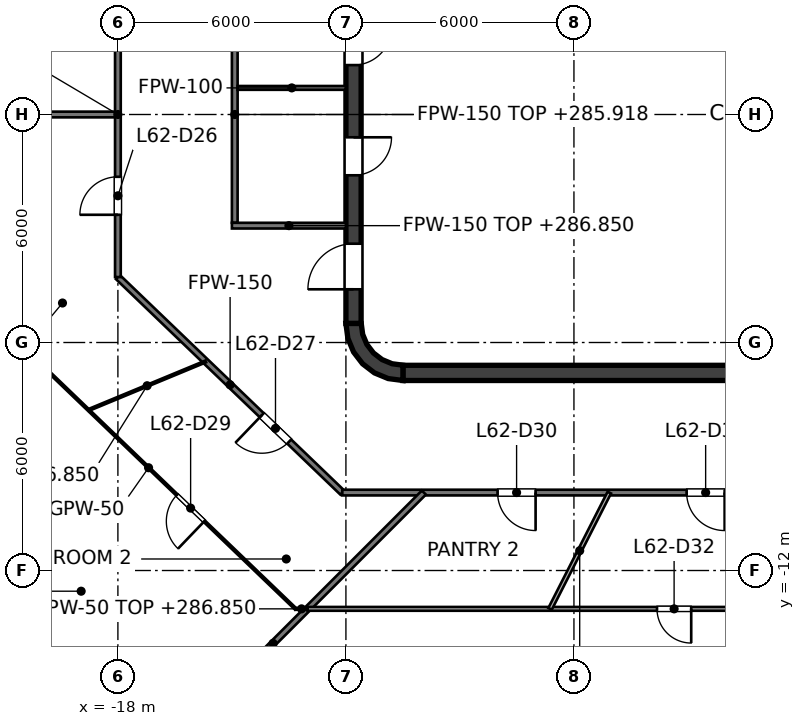
"""IFC4 building model, lengths in metres.
Left out: names, types, materials, properties, quantities, classifications, styles, units other than length and angle.
Written with IfcOpenShell. Run it as: python <this file> out.ifc"""

import sys

from ifc_helpers import new_model, si_unit, direction, frame, frame_2d, origin, place, context, subcontext, project, spatial, polyline, rectangle, outline, extrude, element, fill, save


model = new_model("IFC4")
c1 = context("Model", 3, precision=1e-05, world=origin(), true_north=direction((0.0, 1.0)))
c2 = subcontext(c1, "Body", "Model", "MODEL_VIEW")
j1 = project(units=[si_unit("LENGTHUNIT", "METRE"), si_unit("PLANEANGLEUNIT", "RADIAN")], contexts=[c1])
p1 = place(None, origin())
s1 = spatial("IfcSite", under=j1, at=p1, CompositionType="ELEMENT")
p2 = place(p1, origin())
s2 = spatial("IfcBuilding", under=s1, at=p2, CompositionType="ELEMENT")
p3 = place(p2, frame((0.0, 0.0, 283.0)))
s3 = spatial("IfcBuildingStorey", under=s2, at=p3, CompositionType="ELEMENT", Elevation=283.0)
p4 = place(p3, frame((-10.5, -6.8, 0.0), z_axis=(0.0, 0.0, 1.0), x_axis=(1.0, 0.0, 0.0)))
e1 = element("IfcWall", 1, at=p4, inside=s3, PredefinedType="SHEAR", context=c2, shape_type="SweptSolid", body=[
    extrude(rectangle(XDim=21.0, YDim=0.4, at=frame_2d((10.5, 0.0))), origin(), (0.0, 0.0, 1.0), 4.0),
])
p5 = place(p3, frame((-11.8, -5.5, 0.0), z_axis=(0.0, 0.0, 1.0), x_axis=(0.0, 1.0, 0.0)))
e2 = element("IfcWall", 2, at=p5, inside=s3, PredefinedType="SHEAR", context=c2, shape_type="SweptSolid", body=[
    extrude(rectangle(XDim=11.0, YDim=0.4, at=frame_2d((5.5, 0.0))), origin(), (0.0, 0.0, 1.0), 4.0),
])
p6 = place(p5, frame((3.9, 0.0, 0.0)))
e3 = element("IfcOpeningElement", 3, at=p6, cuts=e2, PredefinedType="OPENING", context=c2, shape_type="SweptSolid", body=[
    extrude(rectangle(XDim=1.0, YDim=2.1, at=frame_2d((0.5, 1.05))), frame((0.0, 0.2, 0.0), z_axis=(0.0, -1.0, 0.0), x_axis=(1.0, 0.0, 0.0)), (0.0, 0.0, 1.0), 0.4),
])
p7 = place(p5, frame((6.8, 0.0, 0.0)))
e4 = element("IfcOpeningElement", 4, at=p7, cuts=e2, PredefinedType="OPENING", context=c2, shape_type="SweptSolid", body=[
    extrude(rectangle(XDim=1.0, YDim=2.1, at=frame_2d((0.5, 1.05))), frame((0.0, 0.2, 0.0), z_axis=(0.0, -1.0, 0.0), x_axis=(1.0, 0.0, 0.0)), (0.0, 0.0, 1.0), 0.4),
])
p8 = place(p5, frame((0.9, 0.0, 0.0)))
e5 = element("IfcOpeningElement", 5, at=p8, cuts=e2, PredefinedType="OPENING", context=c2, shape_type="SweptSolid", body=[
    extrude(rectangle(XDim=1.2, YDim=2.1, at=frame_2d((0.6, 1.05))), frame((0.0, 0.2, 0.0), z_axis=(0.0, -1.0, 0.0), x_axis=(1.0, 0.0, 0.0)), (0.0, 0.0, 1.0), 0.4),
])
p9 = place(p5, frame((8.9, 0.0, 0.0)))
e6 = element("IfcOpeningElement", 6, at=p9, cuts=e2, PredefinedType="OPENING", context=c2, shape_type="SweptSolid", body=[
    extrude(rectangle(XDim=1.2, YDim=2.1, at=frame_2d((0.6, 1.05))), frame((0.0, 0.2, 0.0), z_axis=(0.0, -1.0, 0.0), x_axis=(1.0, 0.0, 0.0)), (0.0, 0.0, 1.0), 0.4),
])
p10 = place(p3, origin())
e7 = element("IfcWall", 7, at=p10, inside=s3, PredefinedType="SHEAR", context=c2, shape_type="SweptSolid", body=[
    extrude(outline(polyline([(-10.5, -7.0), (-10.5, -6.596), (-10.784, -6.559), (-11.048, -6.45), (-11.275, -6.275), (-11.45, -6.048), (-11.559, -5.784), (-11.596, -5.5), (-12.0, -5.5), (-11.949, -5.888), (-11.799, -6.25), (-11.561, -6.561), (-11.25, -6.799), (-10.888, -6.949), (-10.5, -7.0)])), origin(), (0.0, 0.0, 1.0), 4.0),
])
p11 = place(p3, frame((-9.0, -6.6, 0.0), z_axis=(0.0, 0.0, 1.0), x_axis=(0.0, 1.0, 0.0)))
e8 = element("IfcWall", 8, at=p11, inside=s3, PredefinedType="PARTITIONING", context=c2, shape_type="SweptSolid", body=[
    extrude(rectangle(XDim=2.5, YDim=0.25, at=frame_2d((1.25, 0.0))), origin(), (0.0, 0.0, 1.0), 3.85),
])
p12 = place(p11, frame((0.75, 0.0, 0.0)))
e9 = element("IfcOpeningElement", 9, at=p12, cuts=e8, PredefinedType="OPENING", context=c2, shape_type="SweptSolid", body=[
    extrude(rectangle(XDim=1.0, YDim=2.1, at=frame_2d((0.5, 1.05))), frame((0.0, 0.125, 0.0), z_axis=(0.0, -1.0, 0.0), x_axis=(1.0, 0.0, 0.0)), (0.0, 0.0, 1.0), 0.25),
])
p13 = place(p3, frame((-2.9, -6.6, 0.0), z_axis=(0.0, 0.0, 1.0), x_axis=(0.0, 1.0, 0.0)))
e10 = element("IfcWall", 10, at=p13, inside=s3, PredefinedType="PARTITIONING", context=c2, shape_type="SweptSolid", body=[
    extrude(rectangle(XDim=2.5, YDim=0.25, at=frame_2d((1.25, 0.0))), origin(), (0.0, 0.0, 1.0), 3.85),
])
p14 = place(p13, frame((0.8, 0.0, 0.0)))
e11 = element("IfcOpeningElement", 11, at=p14, cuts=e10, PredefinedType="OPENING", context=c2, shape_type="SweptSolid", body=[
    extrude(rectangle(XDim=0.9, YDim=2.1, at=frame_2d((0.45, 1.05))), frame((0.0, 0.125, 0.0), z_axis=(0.0, -1.0, 0.0), x_axis=(1.0, 0.0, 0.0)), (0.0, 0.0, 1.0), 0.25),
])
p15 = place(p3, frame((-9.125, 1.525, 0.0), z_axis=(0.0, 0.0, 1.0), x_axis=(1.0, 0.0, 0.0)))
e12 = element("IfcWall", 12, at=p15, inside=s3, PredefinedType="SOLIDWALL", context=c2, shape_type="SweptSolid", body=[
    extrude(rectangle(XDim=8.35, YDim=0.25, at=frame_2d((4.175, 0.0))), origin(), (0.0, 0.0, 1.0), 3.85),
])
p16 = place(p15, frame((0.925, 0.0, 0.0)))
e13 = element("IfcOpeningElement", 13, at=p16, cuts=e12, PredefinedType="OPENING", context=c2, shape_type="SweptSolid", body=[
    extrude(rectangle(XDim=1.1, YDim=2.1, at=frame_2d((0.55, 1.05))), frame((0.0, 0.125, 0.0), z_axis=(0.0, -1.0, 0.0), x_axis=(1.0, 0.0, 0.0)), (0.0, 0.0, 1.0), 0.25),
])
p17 = place(p15, frame((3.625, 0.0, 0.0)))
e14 = element("IfcOpeningElement", 14, at=p17, cuts=e12, PredefinedType="OPENING", context=c2, shape_type="SweptSolid", body=[
    extrude(rectangle(XDim=1.1, YDim=2.1, at=frame_2d((0.55, 1.05))), frame((0.0, 0.125, 0.0), z_axis=(0.0, -1.0, 0.0), x_axis=(1.0, 0.0, 0.0)), (0.0, 0.0, 1.0), 0.25),
])
p18 = place(p15, frame((6.325, 0.0, 0.0)))
e15 = element("IfcOpeningElement", 15, at=p18, cuts=e12, PredefinedType="OPENING", context=c2, shape_type="SweptSolid", body=[
    extrude(rectangle(XDim=1.1, YDim=2.1, at=frame_2d((0.55, 1.05))), frame((0.0, 0.125, 0.0), z_axis=(0.0, -1.0, 0.0), x_axis=(1.0, 0.0, 0.0)), (0.0, 0.0, 1.0), 0.25),
])
p19 = place(p3, frame((-9.125, -1.525, 0.0), z_axis=(0.0, 0.0, 1.0), x_axis=(1.0, 0.0, 0.0)))
e16 = element("IfcWall", 16, at=p19, inside=s3, PredefinedType="SOLIDWALL", context=c2, shape_type="SweptSolid", body=[
    extrude(rectangle(XDim=18.25, YDim=0.25, at=frame_2d((9.125, 0.0))), origin(), (0.0, 0.0, 1.0), 3.85),
])
p20 = place(p19, frame((7.15, 0.0, 0.0)))
e17 = element("IfcOpeningElement", 17, at=p20, cuts=e16, PredefinedType="OPENING", context=c2, shape_type="SweptSolid", body=[
    extrude(rectangle(XDim=1.2, YDim=2.1, at=frame_2d((0.6, 1.05))), frame((0.0, 0.125, 0.0), z_axis=(0.0, -1.0, 0.0), x_axis=(1.0, 0.0, 0.0)), (0.0, 0.0, 1.0), 0.25),
])
p21 = place(p19, frame((10.2, 0.0, 0.0)))
e18 = element("IfcOpeningElement", 18, at=p21, cuts=e16, PredefinedType="OPENING", context=c2, shape_type="SweptSolid", body=[
    extrude(rectangle(XDim=1.2, YDim=2.1, at=frame_2d((0.6, 1.05))), frame((0.0, 0.125, 0.0), z_axis=(0.0, -1.0, 0.0), x_axis=(1.0, 0.0, 0.0)), (0.0, 0.0, 1.0), 0.25),
])
p22 = place(p19, frame((16.075, 0.0, 0.0)))
e19 = element("IfcOpeningElement", 19, at=p22, cuts=e16, PredefinedType="OPENING", context=c2, shape_type="SweptSolid", body=[
    extrude(rectangle(XDim=1.0, YDim=2.1, at=frame_2d((0.5, 1.05))), frame((0.0, 0.125, 0.0), z_axis=(0.0, -1.0, 0.0), x_axis=(1.0, 0.0, 0.0)), (0.0, 0.0, 1.0), 0.25),
])
p23 = place(p3, frame((-9.125, -3.975, 0.0), z_axis=(0.0, 0.0, 1.0), x_axis=(1.0, 0.0, 0.0)))
e20 = element("IfcWall", 20, at=p23, inside=s3, PredefinedType="SOLIDWALL", context=c2, shape_type="SweptSolid", body=[
    extrude(rectangle(XDim=12.4, YDim=0.25, at=frame_2d((6.2, 0.0))), origin(), (0.0, 0.0, 1.0), 3.85),
])
p24 = place(p23, frame((1.05, 0.0, 0.0)))
e21 = element("IfcOpeningElement", 21, at=p24, cuts=e20, PredefinedType="OPENING", context=c2, shape_type="SweptSolid", body=[
    extrude(rectangle(XDim=1.2, YDim=2.1, at=frame_2d((0.6, 1.05))), frame((0.0, 0.125, 0.0), z_axis=(0.0, -1.0, 0.0), x_axis=(1.0, 0.0, 0.0)), (0.0, 0.0, 1.0), 0.25),
])
p25 = place(p23, frame((4.1, 0.0, 0.0)))
e22 = element("IfcOpeningElement", 22, at=p25, cuts=e20, PredefinedType="OPENING", context=c2, shape_type="SweptSolid", body=[
    extrude(rectangle(XDim=1.2, YDim=2.1, at=frame_2d((0.6, 1.05))), frame((0.0, 0.125, 0.0), z_axis=(0.0, -1.0, 0.0), x_axis=(1.0, 0.0, 0.0)), (0.0, 0.0, 1.0), 0.25),
])
for number, where, z_axis, x_axis in (
    (23, (-9.0, -3.85, 0.0), (0.0, 0.0, 1.0), (0.0, 1.0, 0.0)),
    (24, (-5.95, -3.85, 0.0), (0.0, 0.0, 1.0), (0.0, 1.0, 0.0)),
    (25, (-2.9, -3.85, 0.0), (0.0, 0.0, 1.0), (0.0, 1.0, 0.0)),
):
    element("IfcWall", number, at=place(p3, frame(where, z_axis=z_axis, x_axis=x_axis)), inside=s3, PredefinedType="SOLIDWALL", context=c2, shape_type="SweptSolid", body=[
        extrude(rectangle(XDim=2.2, YDim=0.25, at=frame_2d((1.1, 0.0))), origin(), (0.0, 0.0, 1.0), 3.85),
    ])
p26 = place(p3, frame((-14.925, -2.85, 0.0), z_axis=(0.0, 0.0, 1.0), x_axis=(0.0, 1.0, 0.0)))
e26 = element("IfcWall", 26, at=p26, inside=s3, PredefinedType="PARTITIONING", context=c2, shape_type="SweptSolid", body=[
    extrude(rectangle(XDim=5.7, YDim=0.15, at=frame_2d((2.85, 0.0))), origin(), (0.0, 0.0, 1.0), 2.918),
])
p27 = place(p3, frame((-15.0, -2.925, 0.0), z_axis=(0.0, 0.0, 1.0), x_axis=(1.0, 0.0, 0.0)))
e27 = element("IfcWall", 27, at=p27, inside=s3, PredefinedType="PARTITIONING", context=c2, shape_type="SweptSolid", body=[
    extrude(rectangle(XDim=3.0, YDim=0.15, at=frame_2d((1.5, 0.0))), origin(), (0.0, 0.0, 1.0), 3.85),
])
p28 = place(p3, frame((-14.85, 0.7, 0.0), z_axis=(0.0, 0.0, 1.0), x_axis=(1.0, 0.0, 0.0)))
e28 = element("IfcWall", 28, at=p28, inside=s3, PredefinedType="PARTITIONING", context=c2, shape_type="SweptSolid", body=[
    extrude(rectangle(XDim=2.85, YDim=0.1, at=frame_2d((1.425, 0.0))), origin(), (0.0, 0.0, 1.0), 3.85),
])
p29 = place(p3, frame((-18.0, -4.278, 0.0), z_axis=(0.0, 0.0, 1.0), x_axis=(0.721290181137, -0.692633001376, 0.0)))
e29 = element("IfcWall", 29, at=p29, inside=s3, PredefinedType="PARTITIONING", context=c2, shape_type="SweptSolid", body=[
    extrude(rectangle(XDim=8.187, YDim=0.15, at=frame_2d((4.094, 0.0))), origin(), (0.0, 0.0, 1.0), 2.927),
])
p30 = place(p29, frame((5.249, 0.0, 0.0)))
e30 = element("IfcOpeningElement", 30, at=p30, cuts=e29, PredefinedType="OPENING", context=c2, shape_type="SweptSolid", body=[
    extrude(rectangle(XDim=1.0, YDim=2.1, at=frame_2d((0.5, 1.05))), frame((0.0, 0.075, 0.0), z_axis=(0.0, -1.0, 0.0), x_axis=(1.0, 0.0, 0.0)), (0.0, 0.0, 1.0), 0.15),
])
p31 = place(p3, frame((-12.095, -9.949, 0.0), z_axis=(0.0, 0.0, 1.0), x_axis=(1.0, 0.0, 0.0)))
e31 = element("IfcWall", 31, at=p31, inside=s3, PredefinedType="PARTITIONING", context=c2, shape_type="SweptSolid", body=[
    extrude(rectangle(XDim=24.19, YDim=0.15, at=frame_2d((12.095, 0.0))), origin(), (0.0, 0.0, 1.0), 2.927),
])
p32 = place(p31, frame((17.643, 0.0, 0.0)))
e32 = element("IfcOpeningElement", 32, at=p32, cuts=e31, PredefinedType="OPENING", context=c2, shape_type="SweptSolid", body=[
    extrude(rectangle(XDim=1.0, YDim=2.1, at=frame_2d((0.5, 1.05))), frame((0.0, 0.075, 0.0), z_axis=(0.0, -1.0, 0.0), x_axis=(1.0, 0.0, 0.0)), (0.0, 0.0, 1.0), 0.15),
])
p33 = place(p31, frame((4.086, 0.0, 0.0)))
e33 = element("IfcOpeningElement", 33, at=p33, cuts=e31, PredefinedType="OPENING", context=c2, shape_type="SweptSolid", body=[
    extrude(rectangle(XDim=1.0, YDim=2.1, at=frame_2d((0.5, 1.05))), frame((0.0, 0.075, 0.0), z_axis=(0.0, -1.0, 0.0), x_axis=(1.0, 0.0, 0.0)), (0.0, 0.0, 1.0), 0.15),
])
p34 = place(p31, frame((9.061, 0.0, 0.0)))
e34 = element("IfcOpeningElement", 34, at=p34, cuts=e31, PredefinedType="OPENING", context=c2, shape_type="SweptSolid", body=[
    extrude(rectangle(XDim=1.0, YDim=2.1, at=frame_2d((0.5, 1.05))), frame((0.0, 0.075, 0.0), z_axis=(0.0, -1.0, 0.0), x_axis=(1.0, 0.0, 0.0)), (0.0, 0.0, 1.0), 0.15),
])
p35 = place(p3, frame((-28.919, 0.0, 0.0), z_axis=(0.0, 0.0, 1.0), x_axis=(1.0, 0.0, 0.0)))
e35 = element("IfcWall", 35, at=p35, inside=s3, PredefinedType="PARTITIONING", context=c2, shape_type="SweptSolid", body=[
    extrude(rectangle(XDim=10.919, YDim=0.15, at=frame_2d((5.459, 0.0))), origin(), (0.0, 0.0, 1.0), 2.995),
])
p36 = place(p3, frame((-17.884, -17.884, 0.0), z_axis=(0.0, 0.0, 1.0), x_axis=(0.707106781187, 0.707106781187, 0.0)))
e36 = element("IfcWall", 36, at=p36, inside=s3, PredefinedType="PARTITIONING", context=c2, shape_type="SweptSolid", body=[
    extrude(rectangle(XDim=11.222, YDim=0.15, at=frame_2d((5.611, 0.0))), origin(), (0.0, 0.0, 1.0), 3.424),
])
p37 = place(p3, frame((-18.0, -4.278, 0.0), z_axis=(0.0, 0.0, 1.0), x_axis=(0.0, 1.0, 0.0)))
e37 = element("IfcWall", 37, at=p37, inside=s3, PredefinedType="PARTITIONING", context=c2, shape_type="SweptSolid", body=[
    extrude(rectangle(XDim=8.556, YDim=0.15, at=frame_2d((4.278, 0.0))), origin(), (0.0, 0.0, 1.0), 2.918),
])
p38 = place(p37, frame((1.639, 0.0, 0.0)))
e38 = element("IfcOpeningElement", 38, at=p38, cuts=e37, PredefinedType="OPENING", context=c2, shape_type="SweptSolid", body=[
    extrude(rectangle(XDim=1.0, YDim=2.1, at=frame_2d((0.5, 1.05))), frame((0.0, 0.075, 0.0), z_axis=(0.0, -1.0, 0.0), x_axis=(1.0, 0.0, 0.0)), (0.0, 0.0, 1.0), 0.15),
])
p39 = place(p3, frame((-21.06, -5.582, 0.0), z_axis=(0.0, 0.0, 1.0), x_axis=(0.72130541771, -0.692617134051, 0.0)))
e39 = element("IfcWall", 39, at=p39, inside=s3, PredefinedType="PARTITIONING", context=c2, shape_type="SweptSolid", body=[
    extrude(rectangle(XDim=10.723, YDim=0.05, at=frame_2d((5.361, 0.0))), origin(), (0.0, 0.0, 1.0), 2.927),
])
p40 = place(p39, frame((6.395, 0.0, 0.0)))
e40 = element("IfcOpeningElement", 40, at=p40, cuts=e39, PredefinedType="OPENING", context=c2, shape_type="SweptSolid", body=[
    extrude(rectangle(XDim=1.0, YDim=2.1, at=frame_2d((0.5, 1.05))), frame((0.0, 0.025, 0.0), z_axis=(0.0, -1.0, 0.0), x_axis=(1.0, 0.0, 0.0)), (0.0, 0.0, 1.0), 0.05),
])
p41 = place(p3, frame((-13.326, -13.009, 0.0), z_axis=(0.0, 0.0, 1.0), x_axis=(1.0, 0.0, 0.0)))
e41 = element("IfcWall", 41, at=p41, inside=s3, PredefinedType="PARTITIONING", context=c2, shape_type="SweptSolid", body=[
    extrude(rectangle(XDim=0.317, YDim=0.05, at=frame_2d((0.158, 0.0))), origin(), (0.0, 0.0, 1.0), 3.85),
])
p42 = place(p3, frame((-18.774, -7.777, 0.0), z_axis=(0.0, 0.0, 1.0), x_axis=(0.92379319059, 0.382891813727, 0.0)))
e42 = element("IfcWall", 42, at=p42, inside=s3, PredefinedType="PARTITIONING", context=c2, shape_type="SweptSolid", body=[
    extrude(rectangle(XDim=3.341, YDim=0.05, at=frame_2d((1.67, 0.0))), origin(), (0.0, 0.0, 1.0), 3.85),
])
p43 = place(p3, frame((-13.009, -13.009, 0.0), z_axis=(0.0, 0.0, 1.0), x_axis=(1.0, 0.0, 0.0)))
e43 = element("IfcWall", 43, at=p43, inside=s3, PredefinedType="PARTITIONING", context=c2, shape_type="SweptSolid", body=[
    extrude(rectangle(XDim=26.335, YDim=0.1, at=frame_2d((13.167, 0.0))), origin(), (0.0, 0.0, 1.0), 2.927),
])
p44 = place(p43, frame((18.822, 0.0, 0.0)))
e44 = element("IfcOpeningElement", 44, at=p44, cuts=e43, PredefinedType="OPENING", context=c2, shape_type="SweptSolid", body=[
    extrude(rectangle(XDim=1.8, YDim=2.1, at=frame_2d((0.9, 1.05))), frame((0.0, 0.05, 0.0), z_axis=(0.0, -1.0, 0.0), x_axis=(1.0, 0.0, 0.0)), (0.0, 0.0, 1.0), 0.1),
])
p45 = place(p43, frame((9.195, 0.0, 0.0)))
e45 = element("IfcOpeningElement", 45, at=p45, cuts=e43, PredefinedType="OPENING", context=c2, shape_type="SweptSolid", body=[
    extrude(rectangle(XDim=0.9, YDim=2.1, at=frame_2d((0.45, 1.05))), frame((0.0, 0.05, 0.0), z_axis=(0.0, -1.0, 0.0), x_axis=(1.0, 0.0, 0.0)), (0.0, 0.0, 1.0), 0.1),
])
p46 = place(p3, frame((-6.628, -13.009, 0.0), z_axis=(0.0, 0.0, 1.0), x_axis=(0.453911937029, 0.891046549526, 0.0)))
e46 = element("IfcWall", 46, at=p46, inside=s3, PredefinedType="PARTITIONING", context=c2, shape_type="SweptSolid", body=[
    extrude(rectangle(XDim=3.434, YDim=0.1, at=frame_2d((1.717, 0.0))), origin(), (0.0, 0.0, 1.0), 3.85),
])
p47 = place(p16, origin())
e47 = element("IfcDoor", 47, at=p47, inside=s3, OperationType="DOUBLE_DOOR_SLIDING", PredefinedType="DOOR", context=c2, shape_type="SweptSolid", body=[
    extrude(rectangle(XDim=1.1, YDim=2.1, at=frame_2d((0.55, 1.05))), frame((0.0, 0.025, 0.0), z_axis=(0.0, -1.0, 0.0), x_axis=(1.0, 0.0, 0.0)), (0.0, 0.0, 1.0), 0.05),
])
fill(e13, e47)
p48 = place(p17, origin())
e48 = element("IfcDoor", 48, at=p48, inside=s3, OperationType="DOUBLE_DOOR_SLIDING", PredefinedType="DOOR", context=c2, shape_type="SweptSolid", body=[
    extrude(rectangle(XDim=1.1, YDim=2.1, at=frame_2d((0.55, 1.05))), frame((0.0, 0.025, 0.0), z_axis=(0.0, -1.0, 0.0), x_axis=(1.0, 0.0, 0.0)), (0.0, 0.0, 1.0), 0.05),
])
fill(e14, e48)
p49 = place(p18, origin())
e49 = element("IfcDoor", 49, at=p49, inside=s3, OperationType="DOUBLE_DOOR_SLIDING", PredefinedType="DOOR", context=c2, shape_type="SweptSolid", body=[
    extrude(rectangle(XDim=1.1, YDim=2.1, at=frame_2d((0.55, 1.05))), frame((0.0, 0.025, 0.0), z_axis=(0.0, -1.0, 0.0), x_axis=(1.0, 0.0, 0.0)), (0.0, 0.0, 1.0), 0.05),
])
fill(e15, e49)
p50 = place(p24, origin())
e50 = element("IfcDoor", 50, at=p50, inside=s3, OperationType="DOUBLE_DOOR_SLIDING", PredefinedType="DOOR", context=c2, shape_type="SweptSolid", body=[
    extrude(rectangle(XDim=1.2, YDim=2.1, at=frame_2d((0.6, 1.05))), frame((0.0, 0.025, 0.0), z_axis=(0.0, -1.0, 0.0), x_axis=(1.0, 0.0, 0.0)), (0.0, 0.0, 1.0), 0.05),
])
fill(e21, e50)
p51 = place(p25, origin())
e51 = element("IfcDoor", 51, at=p51, inside=s3, OperationType="DOUBLE_DOOR_SLIDING", PredefinedType="DOOR", context=c2, shape_type="SweptSolid", body=[
    extrude(rectangle(XDim=1.2, YDim=2.1, at=frame_2d((0.6, 1.05))), frame((0.0, 0.025, 0.0), z_axis=(0.0, -1.0, 0.0), x_axis=(1.0, 0.0, 0.0)), (0.0, 0.0, 1.0), 0.05),
])
fill(e22, e51)
p52 = place(p12, origin())
e52 = element("IfcDoor", 52, at=p52, inside=s3, OperationType="SINGLE_SWING_LEFT", PredefinedType="DOOR", context=c2, shape_type="SweptSolid", body=[
    extrude(rectangle(XDim=1.0, YDim=2.1, at=frame_2d((0.5, 1.05))), frame((0.0, 0.025, 0.0), z_axis=(0.0, -1.0, 0.0), x_axis=(1.0, 0.0, 0.0)), (0.0, 0.0, 1.0), 0.05),
])
fill(e9, e52)
p53 = place(p14, origin())
e53 = element("IfcDoor", 53, at=p53, inside=s3, OperationType="SINGLE_SWING_RIGHT", PredefinedType="DOOR", context=c2, shape_type="SweptSolid", body=[
    extrude(rectangle(XDim=0.9, YDim=2.1, at=frame_2d((0.45, 1.05))), frame((0.0, 0.025, 0.0), z_axis=(0.0, -1.0, 0.0), x_axis=(1.0, 0.0, 0.0)), (0.0, 0.0, 1.0), 0.05),
])
fill(e11, e53)
p54 = place(p6, origin())
e54 = element("IfcDoor", 54, at=p54, inside=s3, OperationType="SINGLE_SWING_RIGHT", PredefinedType="DOOR", context=c2, shape_type="SweptSolid", body=[
    extrude(rectangle(XDim=1.0, YDim=2.1, at=frame_2d((0.5, 1.05))), frame((0.0, 0.025, 0.0), z_axis=(0.0, -1.0, 0.0), x_axis=(1.0, 0.0, 0.0)), (0.0, 0.0, 1.0), 0.05),
])
fill(e3, e54)
p55 = place(p7, origin())
e55 = element("IfcDoor", 55, at=p55, inside=s3, OperationType="SINGLE_SWING_RIGHT", PredefinedType="DOOR", context=c2, shape_type="SweptSolid", body=[
    extrude(rectangle(XDim=1.0, YDim=2.1, at=frame_2d((0.5, 1.05))), frame((0.0, 0.025, 0.0), z_axis=(0.0, -1.0, 0.0), x_axis=(1.0, 0.0, 0.0)), (0.0, 0.0, 1.0), 0.05),
])
fill(e4, e55)
p56 = place(p8, origin())
e56 = element("IfcDoor", 56, at=p56, inside=s3, OperationType="SINGLE_SWING_LEFT", PredefinedType="DOOR", context=c2, shape_type="SweptSolid", body=[
    extrude(rectangle(XDim=1.2, YDim=2.1, at=frame_2d((0.6, 1.05))), frame((0.0, 0.025, 0.0), z_axis=(0.0, -1.0, 0.0), x_axis=(1.0, 0.0, 0.0)), (0.0, 0.0, 1.0), 0.05),
])
fill(e5, e56)
p57 = place(p38, origin())
e57 = element("IfcDoor", 57, at=p57, inside=s3, OperationType="SINGLE_SWING_LEFT", PredefinedType="DOOR", context=c2, shape_type="SweptSolid", body=[
    extrude(rectangle(XDim=1.0, YDim=2.1, at=frame_2d((0.5, 1.05))), frame((0.0, 0.025, 0.0), z_axis=(0.0, -1.0, 0.0), x_axis=(1.0, 0.0, 0.0)), (0.0, 0.0, 1.0), 0.05),
])
fill(e38, e57)
p58 = place(p30, origin())
e58 = element("IfcDoor", 58, at=p58, inside=s3, OperationType="SINGLE_SWING_LEFT", PredefinedType="DOOR", context=c2, shape_type="SweptSolid", body=[
    extrude(rectangle(XDim=1.0, YDim=2.1, at=frame_2d((0.5, 1.05))), frame((0.0, 0.025, 0.0), z_axis=(0.0, -1.0, 0.0), x_axis=(1.0, 0.0, 0.0)), (0.0, 0.0, 1.0), 0.05),
])
fill(e30, e58)
p59 = place(p40, origin())
e59 = element("IfcDoor", 59, at=p59, inside=s3, OperationType="SINGLE_SWING_RIGHT", PredefinedType="DOOR", context=c2, shape_type="SweptSolid", body=[
    extrude(rectangle(XDim=1.0, YDim=2.1, at=frame_2d((0.5, 1.05))), frame((0.0, 0.025, 0.0), z_axis=(0.0, -1.0, 0.0), x_axis=(1.0, 0.0, 0.0)), (0.0, 0.0, 1.0), 0.05),
])
fill(e40, e59)
p60 = place(p33, origin())
e60 = element("IfcDoor", 60, at=p60, inside=s3, OperationType="SINGLE_SWING_RIGHT", PredefinedType="DOOR", context=c2, shape_type="SweptSolid", body=[
    extrude(rectangle(XDim=1.0, YDim=2.1, at=frame_2d((0.5, 1.05))), frame((0.0, 0.025, 0.0), z_axis=(0.0, -1.0, 0.0), x_axis=(1.0, 0.0, 0.0)), (0.0, 0.0, 1.0), 0.05),
])
fill(e33, e60)
p61 = place(p34, origin())
e61 = element("IfcDoor", 61, at=p61, inside=s3, OperationType="SINGLE_SWING_RIGHT", PredefinedType="DOOR", context=c2, shape_type="SweptSolid", body=[
    extrude(rectangle(XDim=1.0, YDim=2.1, at=frame_2d((0.5, 1.05))), frame((0.0, 0.025, 0.0), z_axis=(0.0, -1.0, 0.0), x_axis=(1.0, 0.0, 0.0)), (0.0, 0.0, 1.0), 0.05),
])
fill(e34, e61)
p62 = place(p45, origin())
e62 = element("IfcDoor", 62, at=p62, inside=s3, OperationType="SINGLE_SWING_RIGHT", PredefinedType="DOOR", context=c2, shape_type="SweptSolid", body=[
    extrude(rectangle(XDim=0.9, YDim=2.1, at=frame_2d((0.45, 1.05))), frame((0.0, 0.025, 0.0), z_axis=(0.0, -1.0, 0.0), x_axis=(1.0, 0.0, 0.0)), (0.0, 0.0, 1.0), 0.05),
])
fill(e45, e62)
save(model, sys.argv[1])
